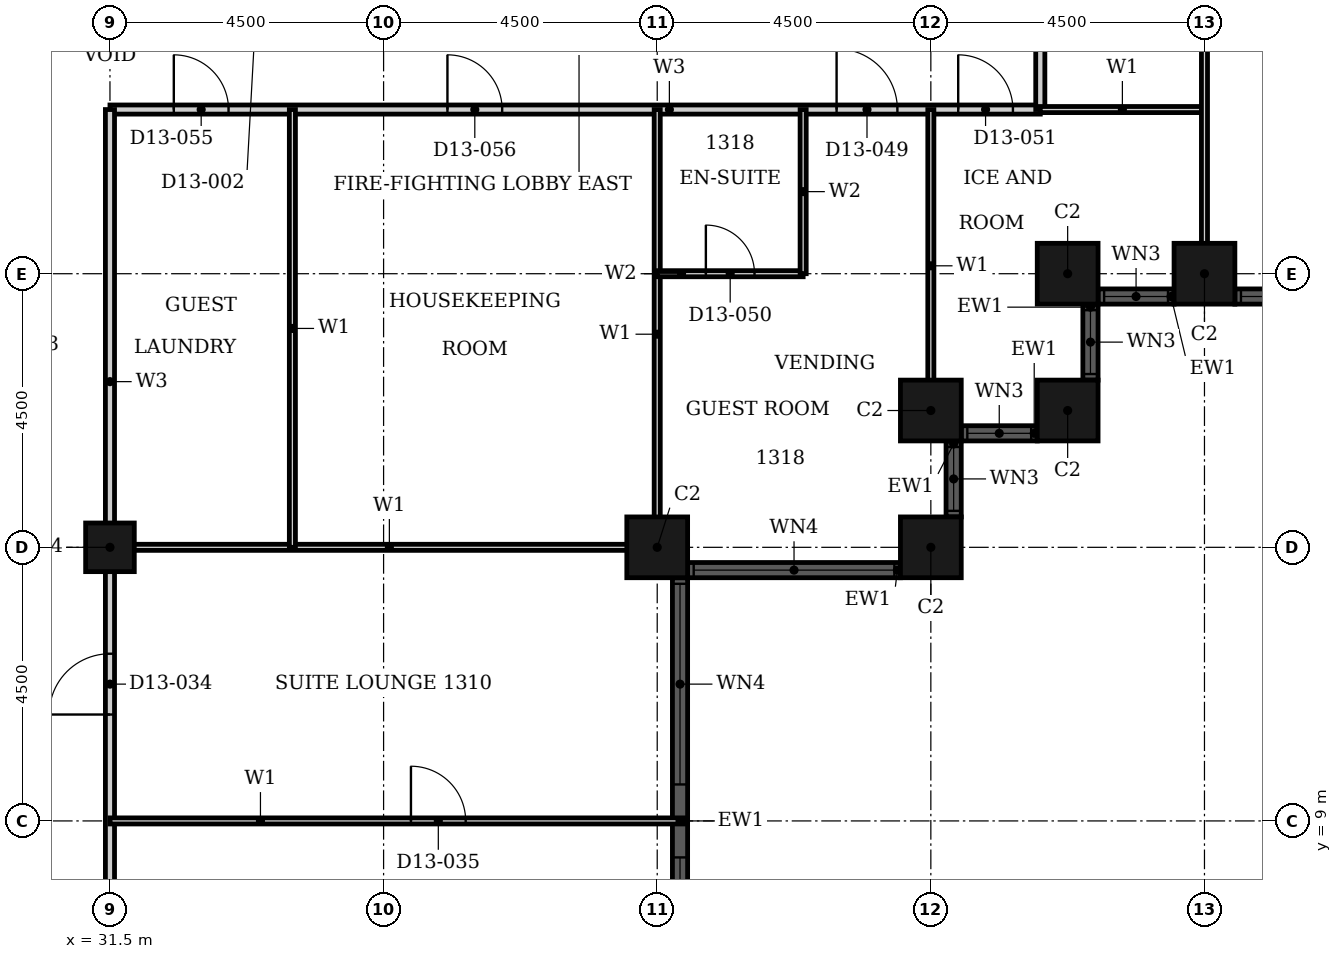
"""IFC4 building model, lengths in metres.
Left out: names, types, materials, properties, quantities, classifications, styles, units other than length and angle.
Written with IfcOpenShell. Run it as: python <this file> out.ifc"""

import sys

from ifc_helpers import new_model, si_unit, direction, frame, frame_2d, origin, origin_2d, place, context, subcontext, project, spatial, rectangle, hollow_rectangle, extrude, element, fill, save


model = new_model("IFC4")
c1 = context("Model", 3, precision=1e-05, world=origin(), true_north=direction((0.0, 1.0)))
c2 = subcontext(c1, "Body", "Model", "MODEL_VIEW")
j1 = project(units=[si_unit("LENGTHUNIT", "METRE"), si_unit("PLANEANGLEUNIT", "RADIAN")], contexts=[c1])
p1 = place(None, origin())
s1 = spatial("IfcSite", under=j1, at=p1, CompositionType="ELEMENT")
p2 = place(p1, origin())
s2 = spatial("IfcBuilding", under=s1, at=p2, CompositionType="ELEMENT")
p3 = place(p2, frame((0.0, 0.0, 60.0)))
s3 = spatial("IfcBuildingStorey", under=s2, at=p3, CompositionType="ELEMENT", Elevation=60.0)
for number, where, z_axis, x_axis in (
    (1, (40.5, 13.5, 0.0), (0.0, 0.0, 1.0), (1.0, 0.0, 0.0)),
    (2, (45.0, 13.5, 0.0), (0.0, 0.0, 1.0), (1.0, 0.0, 0.0)),
    (3, (45.0, 15.75, 0.0), (0.0, 0.0, 1.0), (1.0, 0.0, 0.0)),
    (4, (47.25, 15.75, 0.0), (0.0, 0.0, 1.0), (1.0, 0.0, 0.0)),
    (5, (47.25, 18.0, 0.0), (0.0, 0.0, 1.0), (1.0, 0.0, 0.0)),
    (6, (49.5, 18.0, 0.0), (0.0, 0.0, 1.0), (1.0, 0.0, 0.0)),
):
    element("IfcColumn", number, at=place(p3, frame(where, z_axis=z_axis, x_axis=x_axis)), inside=s3, PredefinedType="COLUMN", context=c2, shape_type="SweptSolid", body=[
        extrude(hollow_rectangle(XDim=1.0, YDim=1.0, WallThickness=0.032, at=origin_2d()), origin(), (0.0, 0.0, 1.0), 3.6),
    ])
p4 = place(p3, frame((31.5, 13.5, 0.0), z_axis=(0.0, 0.0, 1.0), x_axis=(1.0, 0.0, 0.0)))
e7 = element("IfcColumn", 7, at=p4, inside=s3, PredefinedType="COLUMN", context=c2, shape_type="SweptSolid", body=[
    extrude(hollow_rectangle(XDim=0.8, YDim=0.8, WallThickness=0.025, at=origin_2d()), origin(), (0.0, 0.0, 1.0), 3.6),
])
p5 = place(p3, frame((40.875, 5.0, 0.0), z_axis=(0.0, 0.0, 1.0), x_axis=(0.0, 1.0, 0.0)))
e8 = element("IfcWall", 8, at=p5, inside=s3, PredefinedType="SOLIDWALL", context=c2, shape_type="SweptSolid", body=[
    extrude(rectangle(XDim=8.0, YDim=0.25, at=frame_2d((4.0, 0.0))), origin(), (0.0, 0.0, 1.0), 3.6),
])
p6 = place(p5, frame((0.1, 0.0, 0.9)))
e9 = element("IfcOpeningElement", 9, at=p6, cuts=e8, PredefinedType="OPENING", context=c2, shape_type="SweptSolid", body=[
    extrude(rectangle(XDim=3.3, YDim=2.08, at=frame_2d((1.65, 1.04))), frame((0.0, 0.135, 0.0), z_axis=(0.0, -1.0, 0.0), x_axis=(1.0, 0.0, 0.0)), (0.0, 0.0, 1.0), 0.27),
])
p7 = place(p5, frame((4.6, 0.0, 0.9)))
e10 = element("IfcOpeningElement", 10, at=p7, cuts=e8, PredefinedType="OPENING", context=c2, shape_type="SweptSolid", body=[
    extrude(rectangle(XDim=3.3, YDim=2.08, at=frame_2d((1.65, 1.04))), frame((0.0, 0.135, 0.0), z_axis=(0.0, -1.0, 0.0), x_axis=(1.0, 0.0, 0.0)), (0.0, 0.0, 1.0), 0.27),
])
p8 = place(p3, frame((41.0, 13.125, 0.0), z_axis=(0.0, 0.0, 1.0), x_axis=(1.0, 0.0, 0.0)))
e11 = element("IfcWall", 11, at=p8, inside=s3, PredefinedType="SOLIDWALL", context=c2, shape_type="SweptSolid", body=[
    extrude(rectangle(XDim=3.5, YDim=0.25, at=frame_2d((1.75, 0.0))), origin(), (0.0, 0.0, 1.0), 3.6),
])
p9 = place(p8, frame((0.1, 0.0, 0.9)))
e12 = element("IfcOpeningElement", 12, at=p9, cuts=e11, PredefinedType="OPENING", context=c2, shape_type="SweptSolid", body=[
    extrude(rectangle(XDim=3.3, YDim=2.08, at=frame_2d((1.65, 1.04))), frame((0.0, 0.135, 0.0), z_axis=(0.0, -1.0, 0.0), x_axis=(1.0, 0.0, 0.0)), (0.0, 0.0, 1.0), 0.27),
])
p10 = place(p3, frame((45.375, 14.0, 0.0), z_axis=(0.0, 0.0, 1.0), x_axis=(0.0, 1.0, 0.0)))
e13 = element("IfcWall", 13, at=p10, inside=s3, PredefinedType="SOLIDWALL", context=c2, shape_type="SweptSolid", body=[
    extrude(rectangle(XDim=1.25, YDim=0.25, at=frame_2d((0.625, 0.0))), origin(), (0.0, 0.0, 1.0), 3.6),
])
p11 = place(p10, frame((0.1, 0.0, 0.9)))
e14 = element("IfcOpeningElement", 14, at=p11, cuts=e13, PredefinedType="OPENING", context=c2, shape_type="SweptSolid", body=[
    extrude(rectangle(XDim=1.05, YDim=2.08, at=frame_2d((0.525, 1.04))), frame((0.0, 0.135, 0.0), z_axis=(0.0, -1.0, 0.0), x_axis=(1.0, 0.0, 0.0)), (0.0, 0.0, 1.0), 0.27),
])
p12 = place(p3, frame((45.5, 15.375, 0.0), z_axis=(0.0, 0.0, 1.0), x_axis=(1.0, 0.0, 0.0)))
e15 = element("IfcWall", 15, at=p12, inside=s3, PredefinedType="SOLIDWALL", context=c2, shape_type="SweptSolid", body=[
    extrude(rectangle(XDim=1.25, YDim=0.25, at=frame_2d((0.625, 0.0))), origin(), (0.0, 0.0, 1.0), 3.6),
])
p13 = place(p12, frame((0.1, 0.0, 0.9)))
e16 = element("IfcOpeningElement", 16, at=p13, cuts=e15, PredefinedType="OPENING", context=c2, shape_type="SweptSolid", body=[
    extrude(rectangle(XDim=1.05, YDim=2.08, at=frame_2d((0.525, 1.04))), frame((0.0, 0.135, 0.0), z_axis=(0.0, -1.0, 0.0), x_axis=(1.0, 0.0, 0.0)), (0.0, 0.0, 1.0), 0.27),
])
p14 = place(p3, frame((47.625, 16.25, 0.0), z_axis=(0.0, 0.0, 1.0), x_axis=(0.0, 1.0, 0.0)))
e17 = element("IfcWall", 17, at=p14, inside=s3, PredefinedType="SOLIDWALL", context=c2, shape_type="SweptSolid", body=[
    extrude(rectangle(XDim=1.25, YDim=0.25, at=frame_2d((0.625, 0.0))), origin(), (0.0, 0.0, 1.0), 3.6),
])
p15 = place(p14, frame((0.1, 0.0, 0.9)))
e18 = element("IfcOpeningElement", 18, at=p15, cuts=e17, PredefinedType="OPENING", context=c2, shape_type="SweptSolid", body=[
    extrude(rectangle(XDim=1.05, YDim=2.08, at=frame_2d((0.525, 1.04))), frame((0.0, 0.135, 0.0), z_axis=(0.0, -1.0, 0.0), x_axis=(1.0, 0.0, 0.0)), (0.0, 0.0, 1.0), 0.27),
])
p16 = place(p3, frame((47.75, 17.625, 0.0), z_axis=(0.0, 0.0, 1.0), x_axis=(1.0, 0.0, 0.0)))
e19 = element("IfcWall", 19, at=p16, inside=s3, PredefinedType="SOLIDWALL", context=c2, shape_type="SweptSolid", body=[
    extrude(rectangle(XDim=1.25, YDim=0.25, at=frame_2d((0.625, 0.0))), origin(), (0.0, 0.0, 1.0), 3.6),
])
p17 = place(p16, frame((0.1, 0.0, 0.9)))
e20 = element("IfcOpeningElement", 20, at=p17, cuts=e19, PredefinedType="OPENING", context=c2, shape_type="SweptSolid", body=[
    extrude(rectangle(XDim=1.05, YDim=2.08, at=frame_2d((0.525, 1.04))), frame((0.0, 0.135, 0.0), z_axis=(0.0, -1.0, 0.0), x_axis=(1.0, 0.0, 0.0)), (0.0, 0.0, 1.0), 0.27),
])
p18 = place(p3, frame((50.0, 17.625, 0.0), z_axis=(0.0, 0.0, 1.0), x_axis=(1.0, 0.0, 0.0)))
e21 = element("IfcWall", 21, at=p18, inside=s3, PredefinedType="SOLIDWALL", context=c2, shape_type="SweptSolid", body=[
    extrude(rectangle(XDim=8.0, YDim=0.25, at=frame_2d((4.0, 0.0))), origin(), (0.0, 0.0, 1.0), 3.6),
])
p19 = place(p18, frame((0.1, 0.0, 0.9)))
e22 = element("IfcOpeningElement", 22, at=p19, cuts=e21, PredefinedType="OPENING", context=c2, shape_type="SweptSolid", body=[
    extrude(rectangle(XDim=3.3, YDim=2.08, at=frame_2d((1.65, 1.04))), frame((0.0, 0.135, 0.0), z_axis=(0.0, -1.0, 0.0), x_axis=(1.0, 0.0, 0.0)), (0.0, 0.0, 1.0), 0.27),
])
p20 = place(p18, frame((4.6, 0.0, 0.9)))
e23 = element("IfcOpeningElement", 23, at=p20, cuts=e21, PredefinedType="OPENING", context=c2, shape_type="SweptSolid", body=[
    extrude(rectangle(XDim=3.3, YDim=2.08, at=frame_2d((1.65, 1.04))), frame((0.0, 0.135, 0.0), z_axis=(0.0, -1.0, 0.0), x_axis=(1.0, 0.0, 0.0)), (0.0, 0.0, 1.0), 0.27),
])
p21 = place(p3, frame((31.5, 20.7, 0.0), z_axis=(0.0, 0.0, 1.0), x_axis=(1.0, 0.0, 0.0)))
e24 = element("IfcWall", 24, at=p21, inside=s3, PredefinedType="PARTITIONING", context=c2, shape_type="SweptSolid", body=[
    extrude(rectangle(XDim=15.3, YDim=0.15, at=frame_2d((7.65, 0.0))), origin(), (0.0, 0.0, 1.0), 3.3),
])
p22 = place(p21, frame((11.95, 0.0, 0.0)))
e25 = element("IfcOpeningElement", 25, at=p22, cuts=e24, PredefinedType="OPENING", context=c2, shape_type="SweptSolid", body=[
    extrude(rectangle(XDim=1.0, YDim=2.1, at=frame_2d((0.5, 1.05))), frame((0.0, 0.085, 0.0), z_axis=(0.0, -1.0, 0.0), x_axis=(1.0, 0.0, 0.0)), (0.0, 0.0, 1.0), 0.17),
])
p23 = place(p21, frame((13.95, 0.0, 0.0)))
e26 = element("IfcOpeningElement", 26, at=p23, cuts=e24, PredefinedType="OPENING", context=c2, shape_type="SweptSolid", body=[
    extrude(rectangle(XDim=0.9, YDim=2.1, at=frame_2d((0.45, 1.05))), frame((0.0, 0.085, 0.0), z_axis=(0.0, -1.0, 0.0), x_axis=(1.0, 0.0, 0.0)), (0.0, 0.0, 1.0), 0.17),
])
p24 = place(p21, frame((1.05, 0.0, 0.0)))
e27 = element("IfcOpeningElement", 27, at=p24, cuts=e24, PredefinedType="OPENING", context=c2, shape_type="SweptSolid", body=[
    extrude(rectangle(XDim=0.9, YDim=2.1, at=frame_2d((0.45, 1.05))), frame((0.0, 0.085, 0.0), z_axis=(0.0, -1.0, 0.0), x_axis=(1.0, 0.0, 0.0)), (0.0, 0.0, 1.0), 0.17),
])
p25 = place(p21, frame((5.55, 0.0, 0.0)))
e28 = element("IfcOpeningElement", 28, at=p25, cuts=e24, PredefinedType="OPENING", context=c2, shape_type="SweptSolid", body=[
    extrude(rectangle(XDim=0.9, YDim=2.1, at=frame_2d((0.45, 1.05))), frame((0.0, 0.085, 0.0), z_axis=(0.0, -1.0, 0.0), x_axis=(1.0, 0.0, 0.0)), (0.0, 0.0, 1.0), 0.17),
])
p26 = place(p3, frame((31.5, 4.5, 0.0), z_axis=(0.0, 0.0, 1.0), x_axis=(0.0, 1.0, 0.0)))
e29 = element("IfcWall", 29, at=p26, inside=s3, PredefinedType="PARTITIONING", context=c2, shape_type="SweptSolid", body=[
    extrude(rectangle(XDim=16.2, YDim=0.15, at=frame_2d((8.1, 0.0))), origin(), (0.0, 0.0, 1.0), 2.58),
])
p27 = place(p26, frame((6.25, 0.0, 0.0)))
e30 = element("IfcOpeningElement", 30, at=p27, cuts=e29, PredefinedType="OPENING", context=c2, shape_type="SweptSolid", body=[
    extrude(rectangle(XDim=1.0, YDim=2.1, at=frame_2d((0.5, 1.05))), frame((0.0, 0.085, 0.0), z_axis=(0.0, -1.0, 0.0), x_axis=(1.0, 0.0, 0.0)), (0.0, 0.0, 1.0), 0.17),
])
p28 = place(p3, frame((46.8, 20.7, 0.0), z_axis=(0.0, 0.0, 1.0), x_axis=(0.0, 1.0, 0.0)))
e31 = element("IfcWall", 31, at=p28, inside=s3, PredefinedType="PARTITIONING", context=c2, shape_type="SweptSolid", body=[
    extrude(rectangle(XDim=6.3, YDim=0.15, at=frame_2d((3.15, 0.0))), origin(), (0.0, 0.0, 1.0), 3.3),
])
p29 = place(p28, frame((2.625, 0.0, 0.0)))
e32 = element("IfcOpeningElement", 32, at=p29, cuts=e31, PredefinedType="OPENING", context=c2, shape_type="SweptSolid", body=[
    extrude(rectangle(XDim=0.95, YDim=2.1, at=frame_2d((0.475, 1.05))), frame((0.0, 0.085, 0.0), z_axis=(0.0, -1.0, 0.0), x_axis=(1.0, 0.0, 0.0)), (0.0, 0.0, 1.0), 0.17),
])
p30 = place(p3, frame((31.5, 13.5, 0.0), z_axis=(0.0, 0.0, 1.0), x_axis=(1.0, 0.0, 0.0)))
e33 = element("IfcWall", 33, at=p30, inside=s3, PredefinedType="PARTITIONING", context=c2, shape_type="SweptSolid", body=[
    extrude(rectangle(XDim=9.19, YDim=0.1, at=frame_2d((4.595, 0.0))), origin(), (0.0, 0.0, 1.0), 2.38),
])
p31 = place(p3, frame((46.8, 20.7, 0.0), z_axis=(0.0, 0.0, 1.0), x_axis=(1.0, 0.0, 0.0)))
e34 = element("IfcWall", 34, at=p31, inside=s3, PredefinedType="PARTITIONING", context=c2, shape_type="SweptSolid", body=[
    extrude(rectangle(XDim=2.7, YDim=0.1, at=frame_2d((1.35, 0.0))), origin(), (0.0, 0.0, 1.0), 3.3),
])
p32 = place(p3, frame((31.5, 9.0, 0.0), z_axis=(0.0, 0.0, 1.0), x_axis=(1.0, 0.0, 0.0)))
e35 = element("IfcWall", 35, at=p32, inside=s3, PredefinedType="PARTITIONING", context=c2, shape_type="SweptSolid", body=[
    extrude(rectangle(XDim=9.44, YDim=0.1, at=frame_2d((4.72, 0.0))), origin(), (0.0, 0.0, 1.0), 3.3),
])
p33 = place(p32, frame((4.95, 0.0, 0.0)))
e36 = element("IfcOpeningElement", 36, at=p33, cuts=e35, PredefinedType="OPENING", context=c2, shape_type="SweptSolid", body=[
    extrude(rectangle(XDim=0.9, YDim=2.1, at=frame_2d((0.45, 1.05))), frame((0.0, 0.06, 0.0), z_axis=(0.0, -1.0, 0.0), x_axis=(1.0, 0.0, 0.0)), (0.0, 0.0, 1.0), 0.12),
])
p34 = place(p3, frame((34.5, 13.5, 0.0), z_axis=(0.0, 0.0, 1.0), x_axis=(0.0, 1.0, 0.0)))
e37 = element("IfcWall", 37, at=p34, inside=s3, PredefinedType="PARTITIONING", context=c2, shape_type="SweptSolid", body=[
    extrude(rectangle(XDim=7.2, YDim=0.1, at=frame_2d((3.6, 0.0))), origin(), (0.0, 0.0, 1.0), 3.3),
])
p35 = place(p3, frame((40.5, 13.31, 0.0), z_axis=(0.0, 0.0, 1.0), x_axis=(0.0, 1.0, 0.0)))
e38 = element("IfcWall", 38, at=p35, inside=s3, PredefinedType="PARTITIONING", context=c2, shape_type="SweptSolid", body=[
    extrude(rectangle(XDim=7.39, YDim=0.1, at=frame_2d((3.695, 0.0))), origin(), (0.0, 0.0, 1.0), 3.3),
])
p36 = place(p3, frame((45.0, 15.56, 0.0), z_axis=(0.0, 0.0, 1.0), x_axis=(0.0, 1.0, 0.0)))
e39 = element("IfcWall", 39, at=p36, inside=s3, PredefinedType="PARTITIONING", context=c2, shape_type="SweptSolid", body=[
    extrude(rectangle(XDim=5.14, YDim=0.1, at=frame_2d((2.57, 0.0))), origin(), (0.0, 0.0, 1.0), 3.3),
])
p37 = place(p3, frame((49.5, 17.81, 0.0), z_axis=(0.0, 0.0, 1.0), x_axis=(0.0, 1.0, 0.0)))
e40 = element("IfcWall", 40, at=p37, inside=s3, PredefinedType="PARTITIONING", context=c2, shape_type="SweptSolid", body=[
    extrude(rectangle(XDim=9.19, YDim=0.1, at=frame_2d((4.595, 0.0))), origin(), (0.0, 0.0, 1.0), 2.38),
])
p38 = place(p3, frame((40.5, 18.0, 0.0), z_axis=(0.0, 0.0, 1.0), x_axis=(1.0, 0.0, 0.0)))
e41 = element("IfcWall", 41, at=p38, inside=s3, PredefinedType="PARTITIONING", context=c2, shape_type="SweptSolid", body=[
    extrude(rectangle(XDim=2.4, YDim=0.1, at=frame_2d((1.2, 0.0))), origin(), (0.0, 0.0, 1.0), 3.3),
])
p39 = place(p38, frame((0.8, 0.0, 0.0)))
e42 = element("IfcOpeningElement", 42, at=p39, cuts=e41, PredefinedType="OPENING", context=c2, shape_type="SweptSolid", body=[
    extrude(rectangle(XDim=0.8, YDim=2.1, at=frame_2d((0.4, 1.05))), frame((0.0, 0.06, 0.0), z_axis=(0.0, -1.0, 0.0), x_axis=(1.0, 0.0, 0.0)), (0.0, 0.0, 1.0), 0.12),
])
p40 = place(p3, frame((42.9, 18.0, 0.0), z_axis=(0.0, 0.0, 1.0), x_axis=(0.0, 1.0, 0.0)))
e43 = element("IfcWall", 43, at=p40, inside=s3, PredefinedType="PARTITIONING", context=c2, shape_type="SweptSolid", body=[
    extrude(rectangle(XDim=2.7, YDim=0.1, at=frame_2d((1.35, 0.0))), origin(), (0.0, 0.0, 1.0), 3.3),
])
p41 = place(p6, origin())
e44 = element("IfcWindow", 44, at=p41, inside=s3, PartitioningType="SINGLE_PANEL", PredefinedType="WINDOW", context=c2, shape_type="SweptSolid", body=[
    extrude(rectangle(XDim=3.3, YDim=2.08, at=frame_2d((1.65, 1.04))), frame((0.0, 0.03, 0.0), z_axis=(0.0, -1.0, 0.0), x_axis=(1.0, 0.0, 0.0)), (0.0, 0.0, 1.0), 0.06),
])
fill(e9, e44)
p42 = place(p7, origin())
e45 = element("IfcWindow", 45, at=p42, inside=s3, PartitioningType="SINGLE_PANEL", PredefinedType="WINDOW", context=c2, shape_type="SweptSolid", body=[
    extrude(rectangle(XDim=3.3, YDim=2.08, at=frame_2d((1.65, 1.04))), frame((0.0, 0.03, 0.0), z_axis=(0.0, -1.0, 0.0), x_axis=(1.0, 0.0, 0.0)), (0.0, 0.0, 1.0), 0.06),
])
fill(e10, e45)
p43 = place(p9, origin())
e46 = element("IfcWindow", 46, at=p43, inside=s3, PartitioningType="SINGLE_PANEL", PredefinedType="WINDOW", context=c2, shape_type="SweptSolid", body=[
    extrude(rectangle(XDim=3.3, YDim=2.08, at=frame_2d((1.65, 1.04))), frame((0.0, 0.03, 0.0), z_axis=(0.0, -1.0, 0.0), x_axis=(1.0, 0.0, 0.0)), (0.0, 0.0, 1.0), 0.06),
])
fill(e12, e46)
p44 = place(p11, origin())
e47 = element("IfcWindow", 47, at=p44, inside=s3, PartitioningType="SINGLE_PANEL", PredefinedType="WINDOW", context=c2, shape_type="SweptSolid", body=[
    extrude(rectangle(XDim=1.05, YDim=2.08, at=frame_2d((0.525, 1.04))), frame((0.0, 0.03, 0.0), z_axis=(0.0, -1.0, 0.0), x_axis=(1.0, 0.0, 0.0)), (0.0, 0.0, 1.0), 0.06),
])
fill(e14, e47)
p45 = place(p13, origin())
e48 = element("IfcWindow", 48, at=p45, inside=s3, PartitioningType="SINGLE_PANEL", PredefinedType="WINDOW", context=c2, shape_type="SweptSolid", body=[
    extrude(rectangle(XDim=1.05, YDim=2.08, at=frame_2d((0.525, 1.04))), frame((0.0, 0.03, 0.0), z_axis=(0.0, -1.0, 0.0), x_axis=(1.0, 0.0, 0.0)), (0.0, 0.0, 1.0), 0.06),
])
fill(e16, e48)
p46 = place(p15, origin())
e49 = element("IfcWindow", 49, at=p46, inside=s3, PartitioningType="SINGLE_PANEL", PredefinedType="WINDOW", context=c2, shape_type="SweptSolid", body=[
    extrude(rectangle(XDim=1.05, YDim=2.08, at=frame_2d((0.525, 1.04))), frame((0.0, 0.03, 0.0), z_axis=(0.0, -1.0, 0.0), x_axis=(1.0, 0.0, 0.0)), (0.0, 0.0, 1.0), 0.06),
])
fill(e18, e49)
p47 = place(p17, origin())
e50 = element("IfcWindow", 50, at=p47, inside=s3, PartitioningType="SINGLE_PANEL", PredefinedType="WINDOW", context=c2, shape_type="SweptSolid", body=[
    extrude(rectangle(XDim=1.05, YDim=2.08, at=frame_2d((0.525, 1.04))), frame((0.0, 0.03, 0.0), z_axis=(0.0, -1.0, 0.0), x_axis=(1.0, 0.0, 0.0)), (0.0, 0.0, 1.0), 0.06),
])
fill(e20, e50)
p48 = place(p19, origin())
e51 = element("IfcWindow", 51, at=p48, inside=s3, PartitioningType="SINGLE_PANEL", PredefinedType="WINDOW", context=c2, shape_type="SweptSolid", body=[
    extrude(rectangle(XDim=3.3, YDim=2.08, at=frame_2d((1.65, 1.04))), frame((0.0, 0.03, 0.0), z_axis=(0.0, -1.0, 0.0), x_axis=(1.0, 0.0, 0.0)), (0.0, 0.0, 1.0), 0.06),
])
fill(e22, e51)
p49 = place(p27, origin())
e52 = element("IfcDoor", 52, at=p49, inside=s3, OperationType="SINGLE_SWING_RIGHT", PredefinedType="DOOR", context=c2, shape_type="SweptSolid", body=[
    extrude(rectangle(XDim=1.0, YDim=2.1, at=frame_2d((0.5, 1.05))), frame((0.0, 0.025, 0.0), z_axis=(0.0, -1.0, 0.0), x_axis=(1.0, 0.0, 0.0)), (0.0, 0.0, 1.0), 0.05),
])
fill(e30, e52)
p50 = place(p33, origin())
e53 = element("IfcDoor", 53, at=p50, inside=s3, OperationType="SINGLE_SWING_RIGHT", PredefinedType="DOOR", context=c2, shape_type="SweptSolid", body=[
    extrude(rectangle(XDim=0.9, YDim=2.1, at=frame_2d((0.45, 1.05))), frame((0.0, 0.025, 0.0), z_axis=(0.0, -1.0, 0.0), x_axis=(1.0, 0.0, 0.0)), (0.0, 0.0, 1.0), 0.05),
])
fill(e36, e53)
p51 = place(p22, origin())
e54 = element("IfcDoor", 54, at=p51, inside=s3, OperationType="SINGLE_SWING_RIGHT", PredefinedType="DOOR", context=c2, shape_type="SweptSolid", body=[
    extrude(rectangle(XDim=1.0, YDim=2.1, at=frame_2d((0.5, 1.05))), frame((0.0, 0.025, 0.0), z_axis=(0.0, -1.0, 0.0), x_axis=(1.0, 0.0, 0.0)), (0.0, 0.0, 1.0), 0.05),
])
fill(e25, e54)
p52 = place(p39, origin())
e55 = element("IfcDoor", 55, at=p52, inside=s3, OperationType="SINGLE_SWING_LEFT", PredefinedType="DOOR", context=c2, shape_type="SweptSolid", body=[
    extrude(rectangle(XDim=0.8, YDim=2.1, at=frame_2d((0.4, 1.05))), frame((0.0, 0.025, 0.0), z_axis=(0.0, -1.0, 0.0), x_axis=(1.0, 0.0, 0.0)), (0.0, 0.0, 1.0), 0.05),
])
fill(e42, e55)
p53 = place(p23, origin())
e56 = element("IfcDoor", 56, at=p53, inside=s3, OperationType="SINGLE_SWING_RIGHT", PredefinedType="DOOR", context=c2, shape_type="SweptSolid", body=[
    extrude(rectangle(XDim=0.9, YDim=2.1, at=frame_2d((0.45, 1.05))), frame((0.0, 0.025, 0.0), z_axis=(0.0, -1.0, 0.0), x_axis=(1.0, 0.0, 0.0)), (0.0, 0.0, 1.0), 0.05),
])
fill(e26, e56)
p54 = place(p24, origin())
e57 = element("IfcDoor", 57, at=p54, inside=s3, OperationType="SINGLE_SWING_LEFT", PredefinedType="DOOR", context=c2, shape_type="SweptSolid", body=[
    extrude(rectangle(XDim=0.9, YDim=2.1, at=frame_2d((0.45, 1.05))), frame((0.0, 0.025, 0.0), z_axis=(0.0, -1.0, 0.0), x_axis=(1.0, 0.0, 0.0)), (0.0, 0.0, 1.0), 0.05),
])
fill(e27, e57)
p55 = place(p25, origin())
e58 = element("IfcDoor", 58, at=p55, inside=s3, OperationType="SINGLE_SWING_RIGHT", PredefinedType="DOOR", context=c2, shape_type="SweptSolid", body=[
    extrude(rectangle(XDim=0.9, YDim=2.1, at=frame_2d((0.45, 1.05))), frame((0.0, 0.025, 0.0), z_axis=(0.0, -1.0, 0.0), x_axis=(1.0, 0.0, 0.0)), (0.0, 0.0, 1.0), 0.05),
])
fill(e28, e58)
save(model, sys.argv[1])
